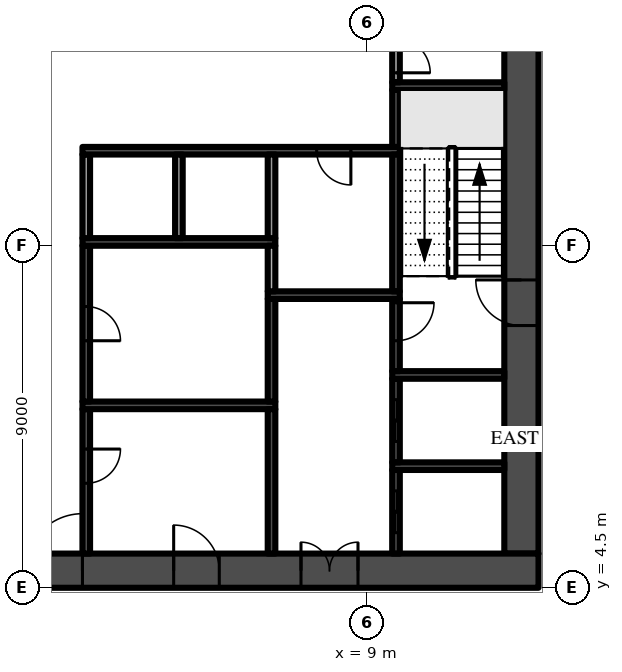
"""IFC4 building model, lengths in metres.
Left out: names, types, materials, properties, quantities, classifications, styles, units other than length and angle.
Written with IfcOpenShell. Run it as: python <this file> out.ifc"""

import sys

from ifc_helpers import new_model, si_unit, direction, frame, frame_2d, origin, place, context, subcontext, project, spatial, rectangle, extrude, element, fill, save


model = new_model("IFC4")
c1 = context("Model", 3, precision=1e-05, world=origin(), true_north=direction((0.0, 1.0)))
c2 = subcontext(c1, "Body", "Model", "MODEL_VIEW")
j1 = project(units=[si_unit("LENGTHUNIT", "METRE"), si_unit("PLANEANGLEUNIT", "RADIAN")], contexts=[c1])
p1 = place(None, origin())
s1 = spatial("IfcSite", under=j1, at=p1, CompositionType="ELEMENT")
p2 = place(p1, origin())
s2 = spatial("IfcBuilding", under=s1, at=p2, CompositionType="ELEMENT")
p3 = place(p2, frame((0.0, 0.0, 10.5)))
s3 = spatial("IfcBuildingStorey", under=s2, at=p3, CompositionType="ELEMENT", Elevation=10.5)
p4 = place(p3, frame((-13.5, 4.95, -0.35), z_axis=(0.0, 0.0, 1.0), x_axis=(1.0, 0.0, 0.0)))
e1 = element("IfcWall", 1, at=p4, inside=s3, PredefinedType="SHEAR", context=c2, shape_type="SweptSolid", body=[
    extrude(rectangle(XDim=27.0, YDim=0.9, at=frame_2d((13.5, 0.0))), origin(), (0.0, 0.0, 1.0), 4.55),
])
p5 = place(p4, frame((12.0, 0.0, 0.35)))
e2 = element("IfcOpeningElement", 2, at=p5, cuts=e1, PredefinedType="OPENING", context=c2, shape_type="SweptSolid", body=[
    extrude(rectangle(XDim=3.0, YDim=2.4, at=frame_2d((1.5, 1.2))), frame((0.0, 0.46, 0.0), z_axis=(0.0, -1.0, 0.0), x_axis=(1.0, 0.0, 0.0)), (0.0, 0.0, 1.0), 0.92),
])
p6 = place(p4, frame((4.9, 0.0, 0.35)))
e3 = element("IfcOpeningElement", 3, at=p6, cuts=e1, PredefinedType="OPENING", context=c2, shape_type="SweptSolid", body=[
    extrude(rectangle(XDim=1.2, YDim=2.2, at=frame_2d((0.6, 1.1))), frame((0.0, 0.46, 0.0), z_axis=(0.0, -1.0, 0.0), x_axis=(1.0, 0.0, 0.0)), (0.0, 0.0, 1.0), 0.92),
])
p7 = place(p4, frame((20.75, 0.0, 0.35)))
e4 = element("IfcOpeningElement", 4, at=p7, cuts=e1, PredefinedType="OPENING", context=c2, shape_type="SweptSolid", body=[
    extrude(rectangle(XDim=1.5, YDim=2.2, at=frame_2d((0.75, 1.1))), frame((0.0, 0.46, 0.0), z_axis=(0.0, -1.0, 0.0), x_axis=(1.0, 0.0, 0.0)), (0.0, 0.0, 1.0), 0.92),
])
p8 = place(p4, frame((17.4, 0.0, 0.35)))
e5 = element("IfcOpeningElement", 5, at=p8, cuts=e1, PredefinedType="OPENING", context=c2, shape_type="SweptSolid", body=[
    extrude(rectangle(XDim=1.2, YDim=2.2, at=frame_2d((0.6, 1.1))), frame((0.0, 0.46, 0.0), z_axis=(0.0, -1.0, 0.0), x_axis=(1.0, 0.0, 0.0)), (0.0, 0.0, 1.0), 0.92),
])
p9 = place(p3, frame((13.05, 5.4, -0.35), z_axis=(0.0, 0.0, 1.0), x_axis=(0.0, 1.0, 0.0)))
e6 = element("IfcWall", 6, at=p9, inside=s3, PredefinedType="SHEAR", context=c2, shape_type="SweptSolid", body=[
    extrude(rectangle(XDim=16.2, YDim=0.9, at=frame_2d((8.1, 0.0))), origin(), (0.0, 0.0, 1.0), 4.55),
])
p10 = place(p9, frame((6.0, 0.0, 0.35)))
e7 = element("IfcOpeningElement", 7, at=p10, cuts=e6, PredefinedType="OPENING", context=c2, shape_type="SweptSolid", body=[
    extrude(rectangle(XDim=1.2, YDim=2.2, at=frame_2d((0.6, 1.1))), frame((0.0, 0.46, 0.0), z_axis=(0.0, -1.0, 0.0), x_axis=(1.0, 0.0, 0.0)), (0.0, 0.0, 1.0), 0.92),
])
p11 = place(p3, frame((1.6, 9.2, 0.0), z_axis=(0.0, 0.0, 1.0), x_axis=(0.0, -1.0, 0.0)))
e8 = element("IfcWall", 8, at=p11, inside=s3, PredefinedType="SHEAR", context=c2, shape_type="SweptSolid", body=[
    extrude(rectangle(XDim=3.8, YDim=0.2, at=frame_2d((1.9, 0.0))), origin(), (0.0, 0.0, 1.0), 4.2),
])
p12 = place(p11, frame((1.05, 0.0, 0.0)))
e9 = element("IfcOpeningElement", 9, at=p12, cuts=e8, PredefinedType="OPENING", context=c2, shape_type="SweptSolid", body=[
    extrude(rectangle(XDim=0.9, YDim=2.1, at=frame_2d((0.45, 1.05))), frame((0.0, 0.11, 0.0), z_axis=(0.0, -1.0, 0.0), x_axis=(1.0, 0.0, 0.0)), (0.0, 0.0, 1.0), 0.22),
])
p13 = place(p3, frame((1.5, 9.3, 0.0), z_axis=(0.0, 0.0, 1.0), x_axis=(1.0, 0.0, 0.0)))
e10 = element("IfcWall", 10, at=p13, inside=s3, PredefinedType="SHEAR", context=c2, shape_type="SweptSolid", body=[
    extrude(rectangle(XDim=5.075, YDim=0.2, at=frame_2d((2.538, 0.0))), origin(), (0.0, 0.0, 1.0), 4.2),
])
p14 = place(p3, frame((1.6, 13.5, 0.0), z_axis=(0.0, 0.0, 1.0), x_axis=(0.0, -1.0, 0.0)))
e11 = element("IfcWall", 11, at=p14, inside=s3, PredefinedType="SHEAR", context=c2, shape_type="SweptSolid", body=[
    extrude(rectangle(XDim=4.1, YDim=0.2, at=frame_2d((2.05, 0.0))), origin(), (0.0, 0.0, 1.0), 4.2),
])
p15 = place(p14, frame((1.6, 0.0, 0.0)))
e12 = element("IfcOpeningElement", 12, at=p15, cuts=e11, PredefinedType="OPENING", context=c2, shape_type="SweptSolid", body=[
    extrude(rectangle(XDim=0.9, YDim=2.1, at=frame_2d((0.45, 1.05))), frame((0.0, 0.11, 0.0), z_axis=(0.0, -1.0, 0.0), x_axis=(1.0, 0.0, 0.0)), (0.0, 0.0, 1.0), 0.22),
])
p16 = place(p3, frame((1.5, 13.6, 0.0), z_axis=(0.0, 0.0, 1.0), x_axis=(1.0, 0.0, 0.0)))
e13 = element("IfcWall", 13, at=p16, inside=s3, PredefinedType="SHEAR", context=c2, shape_type="SweptSolid", body=[
    extrude(rectangle(XDim=5.075, YDim=0.2, at=frame_2d((2.538, 0.0))), origin(), (0.0, 0.0, 1.0), 4.2),
])
p17 = place(p3, frame((1.6, 13.7, 0.0), z_axis=(0.0, 0.0, 1.0), x_axis=(0.0, 1.0, 0.0)))
e14 = element("IfcWall", 14, at=p17, inside=s3, PredefinedType="PARTITIONING", context=c2, shape_type="SweptSolid", body=[
    extrude(rectangle(XDim=2.2, YDim=0.2, at=frame_2d((1.1, 0.0))), origin(), (0.0, 0.0, 1.0), 4.2),
])
p18 = place(p3, frame((9.85, 16.0, 0.0), z_axis=(0.0, 0.0, 1.0), x_axis=(-1.0, 0.0, 0.0)))
e15 = element("IfcWall", 15, at=p18, inside=s3, PredefinedType="SHEAR", context=c2, shape_type="SweptSolid", body=[
    extrude(rectangle(XDim=8.35, YDim=0.2, at=frame_2d((4.175, 0.0))), origin(), (0.0, 0.0, 1.0), 4.2),
])
p19 = place(p18, frame((1.288, 0.0, 0.0)))
e16 = element("IfcOpeningElement", 16, at=p19, cuts=e15, PredefinedType="OPENING", context=c2, shape_type="SweptSolid", body=[
    extrude(rectangle(XDim=0.9, YDim=2.1, at=frame_2d((0.45, 1.05))), frame((0.0, 0.11, 0.0), z_axis=(0.0, -1.0, 0.0), x_axis=(1.0, 0.0, 0.0)), (0.0, 0.0, 1.0), 0.22),
])
p20 = place(p3, frame((4.037, 13.7, 0.0), z_axis=(0.0, 0.0, 1.0), x_axis=(0.0, 1.0, 0.0)))
e17 = element("IfcWall", 17, at=p20, inside=s3, PredefinedType="PARTITIONING", context=c2, shape_type="SweptSolid", body=[
    extrude(rectangle(XDim=2.2, YDim=0.2, at=frame_2d((1.1, 0.0))), origin(), (0.0, 0.0, 1.0), 4.2),
])
p21 = place(p3, frame((6.475, 5.4, 0.0), z_axis=(0.0, 0.0, 1.0), x_axis=(0.0, 1.0, 0.0)))
e18 = element("IfcWall", 18, at=p21, inside=s3, PredefinedType="SHEAR", context=c2, shape_type="SweptSolid", body=[
    extrude(rectangle(XDim=3.8, YDim=0.2, at=frame_2d((1.9, 0.0))), origin(), (0.0, 0.0, 1.0), 4.2),
])
p22 = place(p3, frame((6.475, 9.4, 0.0), z_axis=(0.0, 0.0, 1.0), x_axis=(0.0, 1.0, 0.0)))
e19 = element("IfcWall", 19, at=p22, inside=s3, PredefinedType="SHEAR", context=c2, shape_type="SweptSolid", body=[
    extrude(rectangle(XDim=2.7, YDim=0.2, at=frame_2d((1.35, 0.0))), origin(), (0.0, 0.0, 1.0), 4.2),
])
p23 = place(p3, frame((6.375, 12.2, 0.0), z_axis=(0.0, 0.0, 1.0), x_axis=(1.0, 0.0, 0.0)))
e20 = element("IfcWall", 20, at=p23, inside=s3, PredefinedType="SHEAR", context=c2, shape_type="SweptSolid", body=[
    extrude(rectangle(XDim=3.475, YDim=0.2, at=frame_2d((1.738, 0.0))), origin(), (0.0, 0.0, 1.0), 4.2),
])
p24 = place(p3, frame((6.475, 12.3, 0.0), z_axis=(0.0, 0.0, 1.0), x_axis=(0.0, 1.0, 0.0)))
e21 = element("IfcWall", 21, at=p24, inside=s3, PredefinedType="PARTITIONING", context=c2, shape_type="SweptSolid", body=[
    extrude(rectangle(XDim=1.2, YDim=0.2, at=frame_2d((0.6, 0.0))), origin(), (0.0, 0.0, 1.0), 4.2),
])
p25 = place(p3, frame((6.475, 13.7, 0.0), z_axis=(0.0, 0.0, 1.0), x_axis=(0.0, 1.0, 0.0)))
e22 = element("IfcWall", 22, at=p25, inside=s3, PredefinedType="PARTITIONING", context=c2, shape_type="SweptSolid", body=[
    extrude(rectangle(XDim=2.2, YDim=0.2, at=frame_2d((1.1, 0.0))), origin(), (0.0, 0.0, 1.0), 4.2),
])
p26 = place(p3, frame((9.75, 5.4, 0.0), z_axis=(0.0, 0.0, 1.0), x_axis=(0.0, 1.0, 0.0)))
e23 = element("IfcWall", 23, at=p26, inside=s3, PredefinedType="SHEAR", context=c2, shape_type="SweptSolid", body=[
    extrude(rectangle(XDim=2.2, YDim=0.2, at=frame_2d((1.1, 0.0))), origin(), (0.0, 0.0, 1.0), 4.2),
])
p27 = place(p26, frame((0.55, 0.0, 0.0)))
e24 = element("IfcOpeningElement", 24, at=p27, cuts=e23, PredefinedType="OPENING", context=c2, shape_type="SweptSolid", body=[
    extrude(rectangle(XDim=1.1, YDim=2.1, at=frame_2d((0.55, 1.05))), frame((0.0, 0.11, 0.0), z_axis=(0.0, -1.0, 0.0), x_axis=(1.0, 0.0, 0.0)), (0.0, 0.0, 1.0), 0.22),
])
p28 = place(p3, frame((9.65, 7.7, 0.0), z_axis=(0.0, 0.0, 1.0), x_axis=(1.0, 0.0, 0.0)))
e25 = element("IfcWall", 25, at=p28, inside=s3, PredefinedType="SHEAR", context=c2, shape_type="SweptSolid", body=[
    extrude(rectangle(XDim=2.95, YDim=0.2, at=frame_2d((1.475, 0.0))), origin(), (0.0, 0.0, 1.0), 4.2),
])
p29 = place(p3, frame((9.75, 7.8, 0.0), z_axis=(0.0, 0.0, 1.0), x_axis=(0.0, 1.0, 0.0)))
e26 = element("IfcWall", 26, at=p29, inside=s3, PredefinedType="SHEAR", context=c2, shape_type="SweptSolid", body=[
    extrude(rectangle(XDim=2.2, YDim=0.2, at=frame_2d((1.1, 0.0))), origin(), (0.0, 0.0, 1.0), 4.2),
])
p30 = place(p29, frame((0.55, 0.0, 0.0)))
e27 = element("IfcOpeningElement", 27, at=p30, cuts=e26, PredefinedType="OPENING", context=c2, shape_type="SweptSolid", body=[
    extrude(rectangle(XDim=1.1, YDim=2.1, at=frame_2d((0.55, 1.05))), frame((0.0, 0.11, 0.0), z_axis=(0.0, -1.0, 0.0), x_axis=(1.0, 0.0, 0.0)), (0.0, 0.0, 1.0), 0.22),
])
p31 = place(p3, frame((9.65, 10.1, 0.0), z_axis=(0.0, 0.0, 1.0), x_axis=(1.0, 0.0, 0.0)))
e28 = element("IfcWall", 28, at=p31, inside=s3, PredefinedType="SHEAR", context=c2, shape_type="SweptSolid", body=[
    extrude(rectangle(XDim=2.95, YDim=0.2, at=frame_2d((1.475, 0.0))), origin(), (0.0, 0.0, 1.0), 4.2),
])
p32 = place(p3, frame((9.75, 12.1, 0.0), z_axis=(0.0, 0.0, 1.0), x_axis=(0.0, -1.0, 0.0)))
e29 = element("IfcWall", 29, at=p32, inside=s3, PredefinedType="SHEAR", context=c2, shape_type="SweptSolid", body=[
    extrude(rectangle(XDim=1.9, YDim=0.2, at=frame_2d((0.95, 0.0))), origin(), (0.0, 0.0, 1.0), 4.2),
])
p33 = place(p32, frame((0.1, 0.0, 0.0)))
e30 = element("IfcOpeningElement", 30, at=p33, cuts=e29, PredefinedType="OPENING", context=c2, shape_type="SweptSolid", body=[
    extrude(rectangle(XDim=1.0, YDim=2.2, at=frame_2d((0.5, 1.1))), frame((0.0, 0.11, 0.0), z_axis=(0.0, -1.0, 0.0), x_axis=(1.0, 0.0, 0.0)), (0.0, 0.0, 1.0), 0.22),
])
p34 = place(p3, frame((9.75, 12.3, 0.0), z_axis=(0.0, 0.0, 1.0), x_axis=(0.0, 1.0, 0.0)))
e31 = element("IfcWall", 31, at=p34, inside=s3, PredefinedType="SHEAR", context=c2, shape_type="SweptSolid", body=[
    extrude(rectangle(XDim=3.6, YDim=0.2, at=frame_2d((1.8, 0.0))), origin(), (0.0, 0.0, 1.0), 4.2),
])
p35 = place(p3, frame((9.75, 16.1, 0.0), z_axis=(0.0, 0.0, 1.0), x_axis=(0.0, 1.0, 0.0)))
e32 = element("IfcWall", 32, at=p35, inside=s3, PredefinedType="SHEAR", context=c2, shape_type="SweptSolid", body=[
    extrude(rectangle(XDim=1.5, YDim=0.2, at=frame_2d((0.75, 0.0))), origin(), (0.0, 0.0, 1.0), 4.2),
])
p36 = place(p3, frame((9.65, 17.7, 0.0), z_axis=(0.0, 0.0, 1.0), x_axis=(1.0, 0.0, 0.0)))
e33 = element("IfcWall", 33, at=p36, inside=s3, PredefinedType="SHEAR", context=c2, shape_type="SweptSolid", body=[
    extrude(rectangle(XDim=2.95, YDim=0.2, at=frame_2d((1.475, 0.0))), origin(), (0.0, 0.0, 1.0), 4.2),
])
p37 = place(p3, frame((9.75, 19.2, 0.0), z_axis=(0.0, 0.0, 1.0), x_axis=(0.0, -1.0, 0.0)))
e34 = element("IfcWall", 34, at=p37, inside=s3, PredefinedType="PARTITIONING", context=c2, shape_type="SweptSolid", body=[
    extrude(rectangle(XDim=1.4, YDim=0.2, at=frame_2d((0.7, 0.0))), origin(), (0.0, 0.0, 1.0), 4.2),
])
p38 = place(p37, frame((0.25, 0.0, 0.0)))
e35 = element("IfcOpeningElement", 35, at=p38, cuts=e34, PredefinedType="OPENING", context=c2, shape_type="SweptSolid", body=[
    extrude(rectangle(XDim=0.9, YDim=2.1, at=frame_2d((0.45, 1.05))), frame((0.0, 0.11, 0.0), z_axis=(0.0, -1.0, 0.0), x_axis=(1.0, 0.0, 0.0)), (0.0, 0.0, 1.0), 0.22),
])
p39 = place(p5, frame((3.0, 0.0, 0.0), z_axis=(0.0, 0.0, 1.0), x_axis=(-1.0, 0.0, 0.0)))
e36 = element("IfcDoor", 36, at=p39, inside=s3, OperationType="DOUBLE_DOOR_SINGLE_SWING", PredefinedType="DOOR", context=c2, shape_type="SweptSolid", body=[
    extrude(rectangle(XDim=3.0, YDim=2.4, at=frame_2d((1.5, 1.2))), frame((0.0, 0.025, 0.0), z_axis=(0.0, -1.0, 0.0), x_axis=(1.0, 0.0, 0.0)), (0.0, 0.0, 1.0), 0.05),
])
fill(e2, e36)
p40 = place(p10, frame((1.2, 0.0, 0.0), z_axis=(0.0, 0.0, 1.0), x_axis=(-1.0, 0.0, 0.0)))
e37 = element("IfcDoor", 37, at=p40, inside=s3, OperationType="SINGLE_SWING_LEFT", PredefinedType="DOOR", context=c2, shape_type="SweptSolid", body=[
    extrude(rectangle(XDim=1.2, YDim=2.2, at=frame_2d((0.6, 1.1))), frame((0.0, 0.025, 0.0), z_axis=(0.0, -1.0, 0.0), x_axis=(1.0, 0.0, 0.0)), (0.0, 0.0, 1.0), 0.05),
])
fill(e7, e37)
p41 = place(p7, frame((1.5, 0.0, 0.0), z_axis=(0.0, 0.0, 1.0), x_axis=(-1.0, 0.0, 0.0)))
e38 = element("IfcDoor", 38, at=p41, inside=s3, OperationType="DOUBLE_DOOR_SINGLE_SWING", PredefinedType="DOOR", context=c2, shape_type="SweptSolid", body=[
    extrude(rectangle(XDim=1.5, YDim=2.2, at=frame_2d((0.75, 1.1))), frame((0.0, 0.025, 0.0), z_axis=(0.0, -1.0, 0.0), x_axis=(1.0, 0.0, 0.0)), (0.0, 0.0, 1.0), 0.05),
])
fill(e4, e38)
p42 = place(p8, frame((1.2, 0.0, 0.0), z_axis=(0.0, 0.0, 1.0), x_axis=(-1.0, 0.0, 0.0)))
e39 = element("IfcDoor", 39, at=p42, inside=s3, OperationType="SINGLE_SWING_RIGHT", PredefinedType="DOOR", context=c2, shape_type="SweptSolid", body=[
    extrude(rectangle(XDim=1.2, YDim=2.2, at=frame_2d((0.6, 1.1))), frame((0.0, 0.025, 0.0), z_axis=(0.0, -1.0, 0.0), x_axis=(1.0, 0.0, 0.0)), (0.0, 0.0, 1.0), 0.05),
])
fill(e5, e39)
p43 = place(p33, origin())
e40 = element("IfcDoor", 40, at=p43, inside=s3, OperationType="SINGLE_SWING_LEFT", PredefinedType="DOOR", context=c2, shape_type="SweptSolid", body=[
    extrude(rectangle(XDim=1.0, YDim=2.2, at=frame_2d((0.5, 1.1))), frame((0.0, 0.025, 0.0), z_axis=(0.0, -1.0, 0.0), x_axis=(1.0, 0.0, 0.0)), (0.0, 0.0, 1.0), 0.05),
])
fill(e30, e40)
p44 = place(p27, origin())
e41 = element("IfcDoor", 41, at=p44, inside=s3, OperationType="SLIDING_TO_RIGHT", PredefinedType="DOOR", context=c2, shape_type="SweptSolid", body=[
    extrude(rectangle(XDim=1.1, YDim=2.1, at=frame_2d((0.55, 1.05))), frame((0.0, 0.025, 0.0), z_axis=(0.0, -1.0, 0.0), x_axis=(1.0, 0.0, 0.0)), (0.0, 0.0, 1.0), 0.05),
])
fill(e24, e41)
p45 = place(p30, origin())
e42 = element("IfcDoor", 42, at=p45, inside=s3, OperationType="SLIDING_TO_RIGHT", PredefinedType="DOOR", context=c2, shape_type="SweptSolid", body=[
    extrude(rectangle(XDim=1.1, YDim=2.1, at=frame_2d((0.55, 1.05))), frame((0.0, 0.025, 0.0), z_axis=(0.0, -1.0, 0.0), x_axis=(1.0, 0.0, 0.0)), (0.0, 0.0, 1.0), 0.05),
])
fill(e27, e42)
p46 = place(p12, origin())
e43 = element("IfcDoor", 43, at=p46, inside=s3, OperationType="SINGLE_SWING_LEFT", PredefinedType="DOOR", context=c2, shape_type="SweptSolid", body=[
    extrude(rectangle(XDim=0.9, YDim=2.1, at=frame_2d((0.45, 1.05))), frame((0.0, 0.025, 0.0), z_axis=(0.0, -1.0, 0.0), x_axis=(1.0, 0.0, 0.0)), (0.0, 0.0, 1.0), 0.05),
])
fill(e9, e43)
p47 = place(p15, origin())
e44 = element("IfcDoor", 44, at=p47, inside=s3, OperationType="SINGLE_SWING_RIGHT", PredefinedType="DOOR", context=c2, shape_type="SweptSolid", body=[
    extrude(rectangle(XDim=0.9, YDim=2.1, at=frame_2d((0.45, 1.05))), frame((0.0, 0.025, 0.0), z_axis=(0.0, -1.0, 0.0), x_axis=(1.0, 0.0, 0.0)), (0.0, 0.0, 1.0), 0.05),
])
fill(e12, e44)
p48 = place(p19, origin())
e45 = element("IfcDoor", 45, at=p48, inside=s3, OperationType="SINGLE_SWING_LEFT", PredefinedType="DOOR", context=c2, shape_type="SweptSolid", body=[
    extrude(rectangle(XDim=0.9, YDim=2.1, at=frame_2d((0.45, 1.05))), frame((0.0, 0.025, 0.0), z_axis=(0.0, -1.0, 0.0), x_axis=(1.0, 0.0, 0.0)), (0.0, 0.0, 1.0), 0.05),
])
fill(e16, e45)
p49 = place(p38, origin())
e46 = element("IfcDoor", 46, at=p49, inside=s3, OperationType="SINGLE_SWING_RIGHT", PredefinedType="DOOR", context=c2, shape_type="SweptSolid", body=[
    extrude(rectangle(XDim=0.9, YDim=2.1, at=frame_2d((0.45, 1.05))), frame((0.0, 0.025, 0.0), z_axis=(0.0, -1.0, 0.0), x_axis=(1.0, 0.0, 0.0)), (0.0, 0.0, 1.0), 0.05),
])
fill(e35, e46)
save(model, sys.argv[1])
